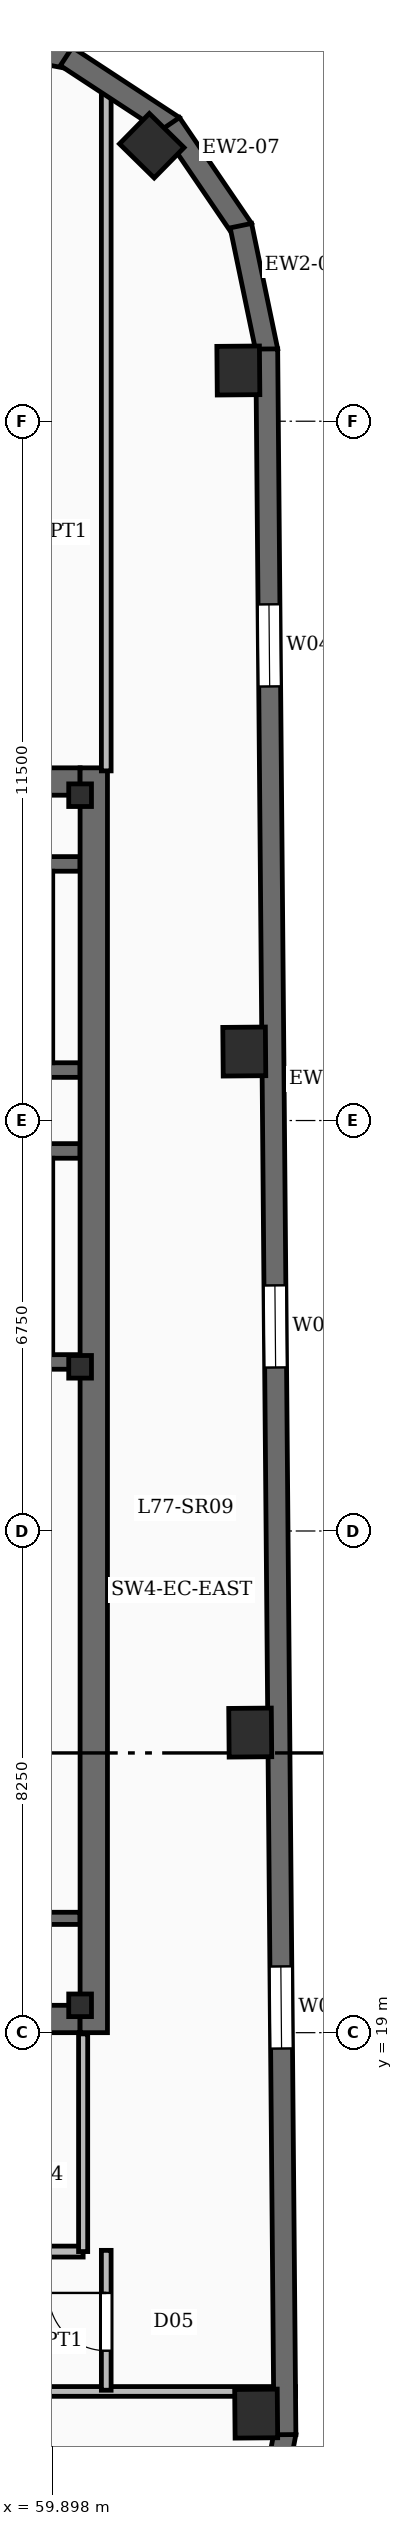
"""IFC4 building model, lengths in metres.
Left out: names, types, materials, properties, quantities, classifications, styles, units other than length and angle.
Written with IfcOpenShell. Run it as: python <this file> out.ifc"""

import sys

from ifc_helpers import new_model, si_unit, direction, frame, frame_2d, origin, origin_2d, place, context, subcontext, project, spatial, rectangle, i_section, extrude, element, fill, save


model = new_model("IFC4")
c1 = context("Model", 3, precision=1e-05, world=origin(), true_north=direction((0.0, 1.0)))
c2 = subcontext(c1, "Body", "Model", "MODEL_VIEW")
j1 = project(units=[si_unit("LENGTHUNIT", "METRE"), si_unit("PLANEANGLEUNIT", "RADIAN")], contexts=[c1])
p1 = place(None, origin())
s1 = spatial("IfcSite", under=j1, at=p1, CompositionType="ELEMENT")
p2 = place(p1, origin())
s2 = spatial("IfcBuilding", under=s1, at=p2, CompositionType="ELEMENT")
p3 = place(p2, frame((0.0, 0.0, 312.4)))
s3 = spatial("IfcBuildingStorey", under=s2, at=p3, CompositionType="ELEMENT", Elevation=312.4)
p4 = place(p3, frame((60.575, 19.0, -0.24), z_axis=(0.0, 0.0, 1.0), x_axis=(0.0, 1.0, 0.0)))
e1 = element("IfcWall", 1, at=p4, inside=s3, PredefinedType="SHEAR", context=c2, shape_type="SweptSolid", body=[
    extrude(rectangle(XDim=20.8, YDim=0.45, at=frame_2d((10.4, 0.0))), origin(), (0.0, 0.0, 1.0), 4.8),
])
for number, where, z_axis, x_axis in (
    (2, (50.55, 19.225, -0.24), (0.0, 0.0, 1.0), (1.0, 0.0, 0.0)),
    (3, (50.55, 39.575, -0.24), (0.0, 0.0, 1.0), (1.0, 0.0, 0.0)),
):
    element("IfcWall", number, at=place(p3, frame(where, z_axis=z_axis, x_axis=x_axis)), inside=s3, PredefinedType="SHEAR", context=c2, shape_type="SweptSolid", body=[
        extrude(rectangle(XDim=9.8, YDim=0.45, at=frame_2d((4.9, 0.0))), origin(), (0.0, 0.0, 1.0), 4.8),
    ])
for number, where, z_axis, x_axis in (
    (4, (60.35, 19.45, -0.24), (0.0, 0.0, 1.0), (1.0, 0.0, 0.0)),
    (5, (60.35, 29.95, -0.24), (0.0, 0.0, 1.0), (1.0, 0.0, 0.0)),
    (6, (60.35, 39.35, -0.24), (0.0, 0.0, 1.0), (1.0, 0.0, 0.0)),
):
    element("IfcColumn", number, at=place(p3, frame(where, z_axis=z_axis, x_axis=x_axis)), inside=s3, PredefinedType="COLUMN", context=c2, shape_type="SweptSolid", body=[
        extrude(i_section(OverallWidth=0.374, OverallDepth=0.372, WebThickness=0.016, FlangeThickness=0.026, FilletRadius=0.02, at=origin_2d()), origin(), (0.0, 0.0, 1.0), 4.8),
    ])
for number, where, z_axis, x_axis in (
    (7, (63.246, 12.735, -0.24), (0.0, 0.0, 1.0), (-0.009, 1.0, 0.0)),
    (8, (63.148, 23.935, -0.24), (0.0, 0.0, 1.0), (-0.009, 1.0, 0.0)),
    (9, (63.05, 35.135, -0.24), (0.0, 0.0, 1.0), (-0.009, 1.0, 0.0)),
    (10, (62.952, 46.334, -0.24), (0.0, 0.0, 1.0), (-0.009, 1.0, 0.0)),
    (11, (61.529, 50.031, -0.24), (0.0, 0.0, 1.0), (-0.713, 0.701, 0.0)),
):
    element("IfcColumn", number, at=place(p3, frame(where, z_axis=z_axis, x_axis=x_axis)), inside=s3, PredefinedType="COLUMN", context=c2, shape_type="SweptSolid", body=[
        extrude(rectangle(XDim=0.8, YDim=0.7, at=origin_2d()), origin(), (0.0, 0.0, 1.0), 4.8),
    ])
p5 = place(p3, frame((63.722, 12.425, 0.0), z_axis=(0.0, 0.0, 1.0), x_axis=(-0.186435855703, -0.98246713518, 0.0)))
e12 = element("IfcWall", 12, at=p5, inside=s3, PredefinedType="SOLIDWALL", context=c2, shape_type="SweptSolid", body=[
    extrude(rectangle(XDim=2.107, YDim=0.36, at=frame_2d((1.053, 0.0))), origin(), (0.0, 0.0, 1.0), 4.56),
])
p6 = place(p3, frame((63.419, 46.688, 0.0), z_axis=(0.0, 0.0, 1.0), x_axis=(0.008726391715, -0.999961924319, 0.0)))
e13 = element("IfcWall", 13, at=p6, inside=s3, PredefinedType="SOLIDWALL", context=c2, shape_type="SweptSolid", body=[
    extrude(rectangle(XDim=34.3, YDim=0.36, at=frame_2d((17.15, 0.0))), origin(), (0.0, 0.0, 1.0), 4.56),
])
p7 = place(p6, frame((4.2, 0.0, 0.88)))
e14 = element("IfcOpeningElement", 14, at=p7, cuts=e13, PredefinedType="OPENING", context=c2, shape_type="SweptSolid", body=[
    extrude(rectangle(XDim=1.35, YDim=2.2, at=frame_2d((0.675, 1.1))), frame((0.0, 0.19, 0.0), z_axis=(0.0, -1.0, 0.0), x_axis=(1.0, 0.0, 0.0)), (0.0, 0.0, 1.0), 0.38),
])
p8 = place(p6, frame((15.4, 0.0, 0.88)))
e15 = element("IfcOpeningElement", 15, at=p8, cuts=e13, PredefinedType="OPENING", context=c2, shape_type="SweptSolid", body=[
    extrude(rectangle(XDim=1.35, YDim=2.2, at=frame_2d((0.675, 1.1))), frame((0.0, 0.19, 0.0), z_axis=(0.0, -1.0, 0.0), x_axis=(1.0, 0.0, 0.0)), (0.0, 0.0, 1.0), 0.38),
])
p9 = place(p6, frame((26.6, 0.0, 0.88)))
e16 = element("IfcOpeningElement", 16, at=p9, cuts=e13, PredefinedType="OPENING", context=c2, shape_type="SweptSolid", body=[
    extrude(rectangle(XDim=1.35, YDim=2.2, at=frame_2d((0.675, 1.1))), frame((0.0, 0.19, 0.0), z_axis=(0.0, -1.0, 0.0), x_axis=(1.0, 0.0, 0.0)), (0.0, 0.0, 1.0), 0.38),
])
for number, where, z_axis, x_axis in (
    (17, (62.994, 48.716, 0.0), (0.0, 0.0, 1.0), (0.204, -0.979, 0.0)),
    (18, (61.836, 50.393, 0.0), (0.0, 0.0, 1.0), (0.563, -0.827, 0.0)),
):
    element("IfcWall", number, at=place(p3, frame(where, z_axis=z_axis, x_axis=x_axis)), inside=s3, PredefinedType="SOLIDWALL", context=c2, shape_type="SweptSolid", body=[
        extrude(rectangle(XDim=2.107, YDim=0.36, at=frame_2d((1.053, 0.0))), origin(), (0.0, 0.0, 1.0), 4.56),
    ])
for number, where, z_axis, x_axis in (
    (19, (60.124, 51.499, 0.0), (0.0, 0.0, 1.0), (0.836, -0.548, 0.0)),
    (20, (58.119, 51.865, 0.0), (0.0, 0.0, 1.0), (0.982, -0.186, 0.0)),
):
    element("IfcWall", number, at=place(p3, frame(where, z_axis=z_axis, x_axis=x_axis)), inside=s3, PredefinedType="SOLIDWALL", context=c2, shape_type="SweptSolid", body=[
        extrude(rectangle(XDim=2.107, YDim=0.36, at=frame_2d((1.053, 0.0))), origin(), (0.0, 0.0, 1.0), 4.56),
    ])
p10 = place(p3, frame((60.35, 30.03, 0.0), z_axis=(0.0, 0.0, 1.0), x_axis=(-1.0, 0.0, 0.0)))
e21 = element("IfcWall", 21, at=p10, inside=s3, PredefinedType="SOLIDWALL", context=c2, shape_type="SweptSolid", body=[
    extrude(rectangle(XDim=9.8, YDim=0.24, at=frame_2d((4.9, 0.0))), origin(), (0.0, 0.0, 1.0), 4.56),
])
p11 = place(p10, frame((7.83, 0.0, 0.0)))
e22 = element("IfcOpeningElement", 22, at=p11, cuts=e21, PredefinedType="OPENING", context=c2, shape_type="SweptSolid", body=[
    extrude(rectangle(XDim=1.1, YDim=2.15, at=frame_2d((0.55, 1.075))), frame((0.0, 0.13, 0.0), z_axis=(0.0, -1.0, 0.0), x_axis=(1.0, 0.0, 0.0)), (0.0, 0.0, 1.0), 0.26),
])
p12 = place(p3, frame((50.55, 33.5, 0.0), z_axis=(0.0, 0.0, 1.0), x_axis=(1.0, 0.0, 0.0)))
e23 = element("IfcWall", 23, at=p12, inside=s3, PredefinedType="SOLIDWALL", context=c2, shape_type="SweptSolid", body=[
    extrude(rectangle(XDim=9.8, YDim=0.24, at=frame_2d((4.9, 0.0))), origin(), (0.0, 0.0, 1.0), 4.56),
])
p13 = place(p3, frame((59.78, 30.15, 0.0), z_axis=(0.0, 0.0, 1.0), x_axis=(0.0, 1.0, 0.0)))
e24 = element("IfcWall", 24, at=p13, inside=s3, PredefinedType="SOLIDWALL", context=c2, shape_type="SweptSolid", body=[
    extrude(rectangle(XDim=3.23, YDim=0.24, at=frame_2d((1.615, 0.0))), origin(), (0.0, 0.0, 1.0), 4.56),
])
p14 = place(p3, frame((60.35, 34.83, 0.0), z_axis=(0.0, 0.0, 1.0), x_axis=(-1.0, 0.0, 0.0)))
e25 = element("IfcWall", 25, at=p14, inside=s3, PredefinedType="SOLIDWALL", context=c2, shape_type="SweptSolid", body=[
    extrude(rectangle(XDim=9.8, YDim=0.24, at=frame_2d((4.9, 0.0))), origin(), (0.0, 0.0, 1.0), 4.56),
])
p15 = place(p14, frame((7.87, 0.0, 0.0)))
e26 = element("IfcOpeningElement", 26, at=p15, cuts=e25, PredefinedType="OPENING", context=c2, shape_type="SweptSolid", body=[
    extrude(rectangle(XDim=1.1, YDim=2.15, at=frame_2d((0.55, 1.075))), frame((0.0, 0.13, 0.0), z_axis=(0.0, -1.0, 0.0), x_axis=(1.0, 0.0, 0.0)), (0.0, 0.0, 1.0), 0.26),
])
p16 = place(p3, frame((50.55, 38.22, 0.0), z_axis=(0.0, 0.0, 1.0), x_axis=(1.0, 0.0, 0.0)))
e27 = element("IfcWall", 27, at=p16, inside=s3, PredefinedType="SOLIDWALL", context=c2, shape_type="SweptSolid", body=[
    extrude(rectangle(XDim=9.8, YDim=0.24, at=frame_2d((4.9, 0.0))), origin(), (0.0, 0.0, 1.0), 4.56),
])
p17 = place(p3, frame((59.78, 34.95, 0.0), z_axis=(0.0, 0.0, 1.0), x_axis=(0.0, 1.0, 0.0)))
e28 = element("IfcWall", 28, at=p17, inside=s3, PredefinedType="SOLIDWALL", context=c2, shape_type="SweptSolid", body=[
    extrude(rectangle(XDim=3.15, YDim=0.24, at=frame_2d((1.575, 0.0))), origin(), (0.0, 0.0, 1.0), 4.56),
])
p18 = place(p3, frame((50.55, 20.88, 0.0), z_axis=(0.0, 0.0, 1.0), x_axis=(1.0, 0.0, 0.0)))
e29 = element("IfcWall", 29, at=p18, inside=s3, PredefinedType="SOLIDWALL", context=c2, shape_type="SweptSolid", body=[
    extrude(rectangle(XDim=9.8, YDim=0.2, at=frame_2d((4.9, 0.0))), origin(), (0.0, 0.0, 1.0), 3.62),
])
p19 = place(p18, frame((1.4, 0.0, 0.0)))
e30 = element("IfcOpeningElement", 30, at=p19, cuts=e29, PredefinedType="OPENING", context=c2, shape_type="SweptSolid", body=[
    extrude(rectangle(XDim=1.05, YDim=2.15, at=frame_2d((0.525, 1.075))), frame((0.0, 0.11, 0.0), z_axis=(0.0, -1.0, 0.0), x_axis=(1.0, 0.0, 0.0)), (0.0, 0.0, 1.0), 0.22),
])
p20 = place(p18, frame((5.5, 0.0, 0.0)))
e31 = element("IfcOpeningElement", 31, at=p20, cuts=e29, PredefinedType="OPENING", context=c2, shape_type="SweptSolid", body=[
    extrude(rectangle(XDim=1.05, YDim=2.15, at=frame_2d((0.525, 1.075))), frame((0.0, 0.11, 0.0), z_axis=(0.0, -1.0, 0.0), x_axis=(1.0, 0.0, 0.0)), (0.0, 0.0, 1.0), 0.22),
])
p21 = place(p3, frame((50.4, 15.4, 0.0), z_axis=(0.0, 0.0, 1.0), x_axis=(1.0, 0.0, 0.0)))
e32 = element("IfcWall", 32, at=p21, inside=s3, PredefinedType="SOLIDWALL", context=c2, shape_type="SweptSolid", body=[
    extrude(rectangle(XDim=10.0, YDim=0.18, at=frame_2d((5.0, 0.0))), origin(), (0.0, 0.0, 1.0), 3.62),
])
p22 = place(p21, frame((1.94, 0.0, 0.0)))
e33 = element("IfcOpeningElement", 33, at=p22, cuts=e32, PredefinedType="OPENING", context=c2, shape_type="SweptSolid", body=[
    extrude(rectangle(XDim=0.92, YDim=2.1, at=frame_2d((0.46, 1.05))), frame((0.0, 0.1, 0.0), z_axis=(0.0, -1.0, 0.0), x_axis=(1.0, 0.0, 0.0)), (0.0, 0.0, 1.0), 0.2),
])
p23 = place(p21, frame((6.97, 0.0, 0.0)))
e34 = element("IfcOpeningElement", 34, at=p23, cuts=e32, PredefinedType="OPENING", context=c2, shape_type="SweptSolid", body=[
    extrude(rectangle(XDim=0.86, YDim=2.05, at=frame_2d((0.43, 1.025))), frame((0.0, 0.1, 0.0), z_axis=(0.0, -1.0, 0.0), x_axis=(1.0, 0.0, 0.0)), (0.0, 0.0, 1.0), 0.2),
])
p24 = place(p3, frame((60.4, 15.4, 0.0), z_axis=(0.0, 0.0, 1.0), x_axis=(0.0, 1.0, 0.0)))
e35 = element("IfcWall", 35, at=p24, inside=s3, PredefinedType="PARTITIONING", context=c2, shape_type="SweptSolid", body=[
    extrude(rectangle(XDim=3.58, YDim=0.15, at=frame_2d((1.79, 0.0))), origin(), (0.0, 0.0, 1.0), 3.62),
])
p25 = place(p3, frame((8.79, 13.1, 0.0), z_axis=(0.0, 0.0, 1.0), x_axis=(1.0, 0.0, 0.0)))
e36 = element("IfcWall", 36, at=p25, inside=s3, PredefinedType="PARTITIONING", context=c2, shape_type="SweptSolid", body=[
    extrude(rectangle(XDim=55.102, YDim=0.16, at=frame_2d((27.551, 0.0))), origin(), (0.0, 0.0, 1.0), 3.62),
])
p26 = place(p25, frame((16.21, 0.0, 0.0)))
e37 = element("IfcOpeningElement", 37, at=p26, cuts=e36, PredefinedType="OPENING", context=c2, shape_type="SweptSolid", body=[
    extrude(rectangle(XDim=1.6, YDim=2.15, at=frame_2d((0.8, 1.075))), frame((0.0, 0.09, 0.0), z_axis=(0.0, -1.0, 0.0), x_axis=(1.0, 0.0, 0.0)), (0.0, 0.0, 1.0), 0.18),
])
p27 = place(p25, frame((37.21, 0.0, 0.0)))
e38 = element("IfcOpeningElement", 38, at=p27, cuts=e36, PredefinedType="OPENING", context=c2, shape_type="SweptSolid", body=[
    extrude(rectangle(XDim=1.6, YDim=2.15, at=frame_2d((0.8, 1.075))), frame((0.0, 0.09, 0.0), z_axis=(0.0, -1.0, 0.0), x_axis=(1.0, 0.0, 0.0)), (0.0, 0.0, 1.0), 0.18),
])
p28 = place(p3, frame((60.78, 39.75, 0.0), z_axis=(0.0, 0.0, 1.0), x_axis=(0.0, 1.0, 0.0)))
e39 = element("IfcWall", 39, at=p28, inside=s3, PredefinedType="PARTITIONING", context=c2, shape_type="SweptSolid", body=[
    extrude(rectangle(XDim=11.247, YDim=0.16, at=frame_2d((5.624, 0.0))), origin(), (0.0, 0.0, 1.0), 3.62),
])
p29 = place(p3, frame((60.78, 13.12, 0.0), z_axis=(0.0, 0.0, 1.0), x_axis=(0.0, 1.0, 0.0)))
e40 = element("IfcWall", 40, at=p29, inside=s3, PredefinedType="PARTITIONING", context=c2, shape_type="SweptSolid", body=[
    extrude(rectangle(XDim=2.3, YDim=0.16, at=frame_2d((1.15, 0.0))), origin(), (0.0, 0.0, 1.0), 3.62),
])
p30 = place(p29, frame((0.65, 0.0, 0.0)))
e41 = element("IfcOpeningElement", 41, at=p30, cuts=e40, PredefinedType="OPENING", context=c2, shape_type="SweptSolid", body=[
    extrude(rectangle(XDim=0.95, YDim=2.15, at=frame_2d((0.475, 1.075))), frame((0.0, 0.09, 0.0), z_axis=(0.0, -1.0, 0.0), x_axis=(1.0, 0.0, 0.0)), (0.0, 0.0, 1.0), 0.18),
])
p31 = place(p7, origin())
e42 = element("IfcWindow", 42, at=p31, inside=s3, PartitioningType="SINGLE_PANEL", PredefinedType="WINDOW", context=c2, shape_type="SweptSolid", body=[
    extrude(rectangle(XDim=1.35, YDim=2.2, at=frame_2d((0.675, 1.1))), frame((0.0, 0.03, 0.0), z_axis=(0.0, -1.0, 0.0), x_axis=(1.0, 0.0, 0.0)), (0.0, 0.0, 1.0), 0.06),
])
fill(e14, e42)
p32 = place(p8, origin())
e43 = element("IfcWindow", 43, at=p32, inside=s3, PartitioningType="SINGLE_PANEL", PredefinedType="WINDOW", context=c2, shape_type="SweptSolid", body=[
    extrude(rectangle(XDim=1.35, YDim=2.2, at=frame_2d((0.675, 1.1))), frame((0.0, 0.03, 0.0), z_axis=(0.0, -1.0, 0.0), x_axis=(1.0, 0.0, 0.0)), (0.0, 0.0, 1.0), 0.06),
])
fill(e15, e43)
p33 = place(p9, origin())
e44 = element("IfcWindow", 44, at=p33, inside=s3, PartitioningType="SINGLE_PANEL", PredefinedType="WINDOW", context=c2, shape_type="SweptSolid", body=[
    extrude(rectangle(XDim=1.35, YDim=2.2, at=frame_2d((0.675, 1.1))), frame((0.0, 0.03, 0.0), z_axis=(0.0, -1.0, 0.0), x_axis=(1.0, 0.0, 0.0)), (0.0, 0.0, 1.0), 0.06),
])
fill(e16, e44)
p34 = place(p30, origin())
e45 = element("IfcDoor", 45, at=p34, inside=s3, OperationType="SINGLE_SWING_RIGHT", PredefinedType="DOOR", context=c2, shape_type="SweptSolid", body=[
    extrude(rectangle(XDim=0.95, YDim=2.15, at=frame_2d((0.475, 1.075))), frame((0.0, 0.025, 0.0), z_axis=(0.0, -1.0, 0.0), x_axis=(1.0, 0.0, 0.0)), (0.0, 0.0, 1.0), 0.05),
])
fill(e41, e45)
save(model, sys.argv[1])
